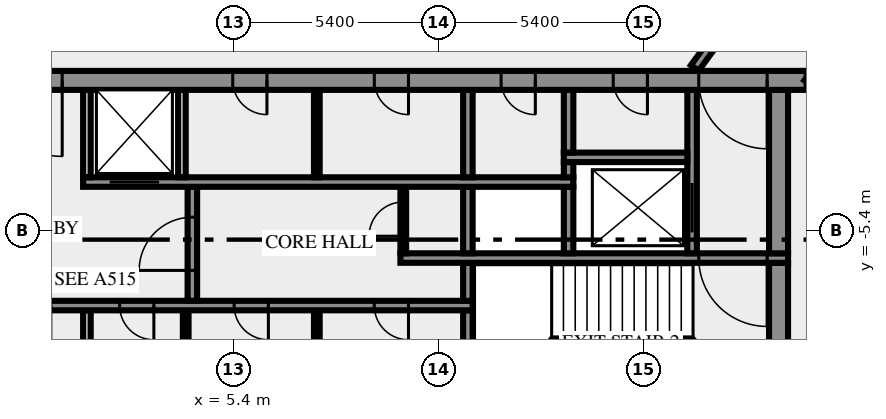
"""IFC4 building model, lengths in metres.
Left out: names, types, materials, properties, quantities, classifications, styles, units other than length and angle.
Written with IfcOpenShell. Run it as: python <this file> out.ifc"""

import sys

from ifc_helpers import new_model, si_unit, direction, frame, frame_2d, origin, place, context, subcontext, project, spatial, rectangle, extrude, element, fill, save


model = new_model("IFC4")
c1 = context("Model", 3, precision=1e-05, world=origin(), true_north=direction((0.0, 1.0)))
c2 = subcontext(c1, "Body", "Model", "MODEL_VIEW")
j1 = project(units=[si_unit("LENGTHUNIT", "METRE"), si_unit("PLANEANGLEUNIT", "RADIAN")], contexts=[c1])
p1 = place(None, origin())
s1 = spatial("IfcSite", under=j1, at=p1, CompositionType="ELEMENT")
p2 = place(p1, origin())
s2 = spatial("IfcBuilding", under=s1, at=p2, CompositionType="ELEMENT")
p3 = place(p2, frame((0.0, 0.0, 297.0)))
s3 = spatial("IfcBuildingStorey", under=s2, at=p3, CompositionType="ELEMENT", Elevation=297.0)
p4 = place(p3, frame((1.55, -10.5, 0.0), z_axis=(0.0, 0.0, 1.0), x_axis=(0.0, 1.0, 0.0)))
e1 = element("IfcWall", 1, at=p4, inside=s3, PredefinedType="SOLIDWALL", context=c2, shape_type="SweptSolid", body=[
    extrude(rectangle(XDim=3.0, YDim=0.2, at=frame_2d((1.5, 0.0))), origin(), (0.0, 0.0, 1.0), 3.4),
])
for number, where, z_axis, x_axis in (
    (2, (4.15, -10.5, 0.0), (0.0, 0.0, 1.0), (0.0, 1.0, 0.0)),
    (3, (7.6, -10.5, 0.0), (0.0, 0.0, 1.0), (0.0, 1.0, 0.0)),
):
    element("IfcWall", number, at=place(p3, frame(where, z_axis=z_axis, x_axis=x_axis)), inside=s3, PredefinedType="PARTITIONING", context=c2, shape_type="SweptSolid", body=[
        extrude(rectangle(XDim=3.0, YDim=0.15, at=frame_2d((1.5, 0.0))), origin(), (0.0, 0.0, 1.0), 3.4),
    ])
p5 = place(p3, frame((11.575, -10.5, 0.0), z_axis=(0.0, 0.0, 1.0), x_axis=(0.0, 1.0, 0.0)))
e4 = element("IfcWall", 4, at=p5, inside=s3, PredefinedType="SHEAR", context=c2, shape_type="SweptSolid", body=[
    extrude(rectangle(XDim=3.0, YDim=0.25, at=frame_2d((1.5, 0.0))), origin(), (0.0, 0.0, 1.0), 3.4),
])
p6 = place(p3, frame((19.75, -10.5, 0.0), z_axis=(0.0, 0.0, 1.0), x_axis=(0.0, 1.0, 0.0)))
e5 = element("IfcWall", 5, at=p6, inside=s3, PredefinedType="SHEAR", context=c2, shape_type="SweptSolid", body=[
    extrude(rectangle(XDim=4.25, YDim=0.5, at=frame_2d((2.125, 0.0))), origin(), (0.0, 0.0, 1.0), 3.4),
])
p7 = place(p3, frame((11.7, -7.375, 0.0), z_axis=(0.0, 0.0, 1.0), x_axis=(-1.0, 0.0, 0.0)))
e6 = element("IfcWall", 6, at=p7, inside=s3, PredefinedType="SHEAR", context=c2, shape_type="SweptSolid", body=[
    extrude(rectangle(XDim=23.4, YDim=0.25, at=frame_2d((11.7, 0.0))), origin(), (0.0, 0.0, 1.0), 3.4),
])
p8 = place(p7, frame((22.225, 0.0, 0.0)))
e7 = element("IfcOpeningElement", 7, at=p8, cuts=e6, PredefinedType="OPENING", context=c2, shape_type="SweptSolid", body=[
    extrude(rectangle(XDim=0.8, YDim=2.1, at=frame_2d((0.4, 1.05))), frame((0.0, 0.135, 0.0), z_axis=(0.0, -1.0, 0.0), x_axis=(1.0, 0.0, 0.0)), (0.0, 0.0, 1.0), 0.27),
])
p9 = place(p7, frame((20.2, 0.0, 0.0)))
e8 = element("IfcOpeningElement", 8, at=p9, cuts=e6, PredefinedType="OPENING", context=c2, shape_type="SweptSolid", body=[
    extrude(rectangle(XDim=1.1, YDim=2.1, at=frame_2d((0.55, 1.05))), frame((0.0, 0.135, 0.0), z_axis=(0.0, -1.0, 0.0), x_axis=(1.0, 0.0, 0.0)), (0.0, 0.0, 1.0), 0.27),
])
p10 = place(p7, frame((17.7, 0.0, 0.0)))
e9 = element("IfcOpeningElement", 9, at=p10, cuts=e6, PredefinedType="OPENING", context=c2, shape_type="SweptSolid", body=[
    extrude(rectangle(XDim=1.1, YDim=2.1, at=frame_2d((0.55, 1.05))), frame((0.0, 0.135, 0.0), z_axis=(0.0, -1.0, 0.0), x_axis=(1.0, 0.0, 0.0)), (0.0, 0.0, 1.0), 0.27),
])
p11 = place(p7, frame((15.975, 0.0, 0.0)))
e10 = element("IfcOpeningElement", 10, at=p11, cuts=e6, PredefinedType="OPENING", context=c2, shape_type="SweptSolid", body=[
    extrude(rectangle(XDim=0.8, YDim=2.1, at=frame_2d((0.4, 1.05))), frame((0.0, 0.135, 0.0), z_axis=(0.0, -1.0, 0.0), x_axis=(1.0, 0.0, 0.0)), (0.0, 0.0, 1.0), 0.27),
])
p12 = place(p7, frame((13.875, 0.0, 0.0)))
e11 = element("IfcOpeningElement", 11, at=p12, cuts=e6, PredefinedType="OPENING", context=c2, shape_type="SweptSolid", body=[
    extrude(rectangle(XDim=0.9, YDim=2.1, at=frame_2d((0.45, 1.05))), frame((0.0, 0.135, 0.0), z_axis=(0.0, -1.0, 0.0), x_axis=(1.0, 0.0, 0.0)), (0.0, 0.0, 1.0), 0.27),
])
p13 = place(p7, frame((11.1, 0.0, 0.0)))
e12 = element("IfcOpeningElement", 12, at=p13, cuts=e6, PredefinedType="OPENING", context=c2, shape_type="SweptSolid", body=[
    extrude(rectangle(XDim=0.9, YDim=2.1, at=frame_2d((0.45, 1.05))), frame((0.0, 0.135, 0.0), z_axis=(0.0, -1.0, 0.0), x_axis=(1.0, 0.0, 0.0)), (0.0, 0.0, 1.0), 0.27),
])
p14 = place(p7, frame((8.388, 0.0, 0.0)))
e13 = element("IfcOpeningElement", 13, at=p14, cuts=e6, PredefinedType="OPENING", context=c2, shape_type="SweptSolid", body=[
    extrude(rectangle(XDim=0.9, YDim=2.1, at=frame_2d((0.45, 1.05))), frame((0.0, 0.135, 0.0), z_axis=(0.0, -1.0, 0.0), x_axis=(1.0, 0.0, 0.0)), (0.0, 0.0, 1.0), 0.27),
])
p15 = place(p7, frame((5.375, 0.0, 0.0)))
e14 = element("IfcOpeningElement", 14, at=p15, cuts=e6, PredefinedType="OPENING", context=c2, shape_type="SweptSolid", body=[
    extrude(rectangle(XDim=0.9, YDim=2.1, at=frame_2d((0.45, 1.05))), frame((0.0, 0.135, 0.0), z_axis=(0.0, -1.0, 0.0), x_axis=(1.0, 0.0, 0.0)), (0.0, 0.0, 1.0), 0.27),
])
p16 = place(p7, frame((1.688, 0.0, 0.0)))
e15 = element("IfcOpeningElement", 15, at=p16, cuts=e6, PredefinedType="OPENING", context=c2, shape_type="SweptSolid", body=[
    extrude(rectangle(XDim=0.9, YDim=2.1, at=frame_2d((0.45, 1.05))), frame((0.0, 0.135, 0.0), z_axis=(0.0, -1.0, 0.0), x_axis=(1.0, 0.0, 0.0)), (0.0, 0.0, 1.0), 0.27),
])
p17 = place(p3, frame((4.325, -7.25, 0.0), z_axis=(0.0, 0.0, 1.0), x_axis=(0.0, 1.0, 0.0)))
e16 = element("IfcWall", 16, at=p17, inside=s3, PredefinedType="SHEAR", context=c2, shape_type="SweptSolid", body=[
    extrude(rectangle(XDim=3.0, YDim=0.25, at=frame_2d((1.5, 0.0))), origin(), (0.0, 0.0, 1.0), 3.4),
])
p18 = place(p17, frame((0.8, 0.0, 0.0)))
e17 = element("IfcOpeningElement", 17, at=p18, cuts=e16, PredefinedType="OPENING", context=c2, shape_type="SweptSolid", body=[
    extrude(rectangle(XDim=1.4, YDim=2.1, at=frame_2d((0.7, 1.05))), frame((0.0, 0.135, 0.0), z_axis=(0.0, -1.0, 0.0), x_axis=(1.0, 0.0, 0.0)), (0.0, 0.0, 1.0), 0.27),
])
p19 = place(p3, frame((11.575, -7.25, 0.0), z_axis=(0.0, 0.0, 1.0), x_axis=(0.0, 1.0, 0.0)))
e18 = element("IfcWall", 18, at=p19, inside=s3, PredefinedType="SHEAR", context=c2, shape_type="SweptSolid", body=[
    extrude(rectangle(XDim=1.0, YDim=0.25, at=frame_2d((0.5, 0.0))), origin(), (0.0, 0.0, 1.0), 3.4),
])
p20 = place(p3, frame((20.0, -6.125, 0.0), z_axis=(0.0, 0.0, 1.0), x_axis=(-1.0, 0.0, 0.0)))
e19 = element("IfcWall", 19, at=p20, inside=s3, PredefinedType="SHEAR", context=c2, shape_type="SweptSolid", body=[
    extrude(rectangle(XDim=10.2, YDim=0.25, at=frame_2d((5.1, 0.0))), origin(), (0.0, 0.0, 1.0), 3.4),
])
p21 = place(p20, frame((0.55, 0.0, 0.0)))
e20 = element("IfcOpeningElement", 20, at=p21, cuts=e19, PredefinedType="OPENING", context=c2, shape_type="SweptSolid", body=[
    extrude(rectangle(XDim=1.8, YDim=2.1, at=frame_2d((0.9, 1.05))), frame((0.0, 0.135, 0.0), z_axis=(0.0, -1.0, 0.0), x_axis=(1.0, 0.0, 0.0)), (0.0, 0.0, 1.0), 0.27),
])
p22 = place(p3, frame((9.875, -6.0, 0.0), z_axis=(0.0, 0.0, 1.0), x_axis=(0.0, 1.0, 0.0)))
e21 = element("IfcWall", 21, at=p22, inside=s3, PredefinedType="PARTITIONING", context=c2, shape_type="SweptSolid", body=[
    extrude(rectangle(XDim=1.75, YDim=0.15, at=frame_2d((0.875, 0.0))), origin(), (0.0, 0.0, 1.0), 3.4),
])
p23 = place(p22, frame((0.45, 0.0, 0.0)))
e22 = element("IfcOpeningElement", 22, at=p23, cuts=e21, PredefinedType="OPENING", context=c2, shape_type="SweptSolid", body=[
    extrude(rectangle(XDim=0.9, YDim=2.1, at=frame_2d((0.45, 1.05))), frame((0.0, 0.085, 0.0), z_axis=(0.0, -1.0, 0.0), x_axis=(1.0, 0.0, 0.0)), (0.0, 0.0, 1.0), 0.17),
])
for number, where, z_axis, x_axis in (
    (23, (11.575, -6.0, 0.0), (0.0, 0.0, 1.0), (0.0, 1.0, 0.0)),
    (24, (14.225, -6.0, 0.0), (0.0, 0.0, 1.0), (0.0, 1.0, 0.0)),
):
    element("IfcWall", number, at=place(p3, frame(where, z_axis=z_axis, x_axis=x_axis)), inside=s3, PredefinedType="SHEAR", context=c2, shape_type="SweptSolid", body=[
        extrude(rectangle(XDim=1.75, YDim=0.25, at=frame_2d((0.875, 0.0))), origin(), (0.0, 0.0, 1.0), 3.4),
    ])
p24 = place(p3, frame((17.475, -6.0, 0.0), z_axis=(0.0, 0.0, 1.0), x_axis=(0.0, 1.0, 0.0)))
e25 = element("IfcWall", 25, at=p24, inside=s3, PredefinedType="SHEAR", context=c2, shape_type="SweptSolid", body=[
    extrude(rectangle(XDim=4.3, YDim=0.25, at=frame_2d((2.15, 0.0))), origin(), (0.0, 0.0, 1.0), 3.4),
])
p25 = place(p24, frame((0.55, 0.0, 0.0)))
e26 = element("IfcOpeningElement", 26, at=p25, cuts=e25, PredefinedType="OPENING", context=c2, shape_type="SweptSolid", body=[
    extrude(rectangle(XDim=1.3, YDim=2.1, at=frame_2d((0.65, 1.05))), frame((0.0, 0.135, 0.0), z_axis=(0.0, -1.0, 0.0), x_axis=(1.0, 0.0, 0.0)), (0.0, 0.0, 1.0), 0.27),
])
p26 = place(p3, frame((19.75, -6.0, 0.0), z_axis=(0.0, 0.0, 1.0), x_axis=(0.0, 1.0, 0.0)))
e27 = element("IfcWall", 27, at=p26, inside=s3, PredefinedType="SHEAR", context=c2, shape_type="SweptSolid", body=[
    extrude(rectangle(XDim=4.3, YDim=0.5, at=frame_2d((2.15, 0.0))), origin(), (0.0, 0.0, 1.0), 3.4),
])
p27 = place(p3, frame((1.45, -4.125, 0.0), z_axis=(0.0, 0.0, 1.0), x_axis=(1.0, 0.0, 0.0)))
e28 = element("IfcWall", 28, at=p27, inside=s3, PredefinedType="SHEAR", context=c2, shape_type="SweptSolid", body=[
    extrude(rectangle(XDim=12.9, YDim=0.25, at=frame_2d((6.45, 0.0))), origin(), (0.0, 0.0, 1.0), 3.4),
])
p28 = place(p27, frame((0.7, 0.0, 0.0)))
e29 = element("IfcOpeningElement", 29, at=p28, cuts=e28, PredefinedType="OPENING", context=c2, shape_type="SweptSolid", body=[
    extrude(rectangle(XDim=1.3, YDim=2.1, at=frame_2d((0.65, 1.05))), frame((0.0, 0.135, 0.0), z_axis=(0.0, -1.0, 0.0), x_axis=(1.0, 0.0, 0.0)), (0.0, 0.0, 1.0), 0.27),
])
for number, where, z_axis, x_axis in (
    (30, (1.55, -4.0, 0.0), (0.0, 0.0, 1.0), (0.0, 1.0, 0.0)),
    (31, (4.05, -4.0, 0.0), (0.0, 0.0, 1.0), (0.0, 1.0, 0.0)),
):
    element("IfcWall", number, at=place(p3, frame(where, z_axis=z_axis, x_axis=x_axis)), inside=s3, PredefinedType="SOLIDWALL", context=c2, shape_type="SweptSolid", body=[
        extrude(rectangle(XDim=2.3, YDim=0.2, at=frame_2d((1.15, 0.0))), origin(), (0.0, 0.0, 1.0), 3.4),
    ])
p29 = place(p3, frame((7.6, -4.0, 0.0), z_axis=(0.0, 0.0, 1.0), x_axis=(0.0, 1.0, 0.0)))
e32 = element("IfcWall", 32, at=p29, inside=s3, PredefinedType="PARTITIONING", context=c2, shape_type="SweptSolid", body=[
    extrude(rectangle(XDim=2.3, YDim=0.15, at=frame_2d((1.15, 0.0))), origin(), (0.0, 0.0, 1.0), 3.4),
])
p30 = place(p3, frame((11.575, -4.0, 0.0), z_axis=(0.0, 0.0, 1.0), x_axis=(0.0, 1.0, 0.0)))
e33 = element("IfcWall", 33, at=p30, inside=s3, PredefinedType="SHEAR", context=c2, shape_type="SweptSolid", body=[
    extrude(rectangle(XDim=2.3, YDim=0.25, at=frame_2d((1.15, 0.0))), origin(), (0.0, 0.0, 1.0), 3.4),
])
p31 = place(p3, frame((14.225, -4.0, 0.0), z_axis=(0.0, 0.0, 1.0), x_axis=(0.0, 1.0, 0.0)))
e34 = element("IfcWall", 34, at=p31, inside=s3, PredefinedType="SHEAR", context=c2, shape_type="SweptSolid", body=[
    extrude(rectangle(XDim=0.4, YDim=0.25, at=frame_2d((0.2, 0.0))), origin(), (0.0, 0.0, 1.0), 3.4),
])
p32 = place(p3, frame((14.1, -3.475, 0.0), z_axis=(0.0, 0.0, 1.0), x_axis=(1.0, 0.0, 0.0)))
e35 = element("IfcWall", 35, at=p32, inside=s3, PredefinedType="SHEAR", context=c2, shape_type="SweptSolid", body=[
    extrude(rectangle(XDim=3.25, YDim=0.25, at=frame_2d((1.625, 0.0))), origin(), (0.0, 0.0, 1.0), 3.4),
])
p33 = place(p3, frame((14.225, -3.35, 0.0), z_axis=(0.0, 0.0, 1.0), x_axis=(0.0, 1.0, 0.0)))
e36 = element("IfcWall", 36, at=p33, inside=s3, PredefinedType="SHEAR", context=c2, shape_type="SweptSolid", body=[
    extrude(rectangle(XDim=1.65, YDim=0.25, at=frame_2d((0.825, 0.0))), origin(), (0.0, 0.0, 1.0), 3.4),
])
p34 = place(p3, frame((20.49, -1.45, 0.0), z_axis=(0.0, 0.0, 1.0), x_axis=(-1.0, 0.0, 0.0)))
e37 = element("IfcWall", 37, at=p34, inside=s3, PredefinedType="SHEAR", context=c2, shape_type="SweptSolid", body=[
    extrude(rectangle(XDim=40.98, YDim=0.5, at=frame_2d((20.49, 0.0))), origin(), (0.0, 0.0, 1.0), 3.4),
])
p35 = place(p34, frame((38.14, 0.0, 0.0)))
e38 = element("IfcOpeningElement", 38, at=p35, cuts=e37, PredefinedType="OPENING", context=c2, shape_type="SweptSolid", body=[
    extrude(rectangle(XDim=1.8, YDim=2.1, at=frame_2d((0.9, 1.05))), frame((0.0, 0.26, 0.0), z_axis=(0.0, -1.0, 0.0), x_axis=(1.0, 0.0, 0.0)), (0.0, 0.0, 1.0), 0.52),
])
p36 = place(p34, frame((36.728, 0.0, 0.0)))
e39 = element("IfcOpeningElement", 39, at=p36, cuts=e37, PredefinedType="OPENING", context=c2, shape_type="SweptSolid", body=[
    extrude(rectangle(XDim=0.8, YDim=2.1, at=frame_2d((0.4, 1.05))), frame((0.0, 0.26, 0.0), z_axis=(0.0, -1.0, 0.0), x_axis=(1.0, 0.0, 0.0)), (0.0, 0.0, 1.0), 0.52),
])
p37 = place(p34, frame((35.153, 0.0, 0.0)))
e40 = element("IfcOpeningElement", 40, at=p37, cuts=e37, PredefinedType="OPENING", context=c2, shape_type="SweptSolid", body=[
    extrude(rectangle(XDim=0.8, YDim=2.1, at=frame_2d((0.4, 1.05))), frame((0.0, 0.26, 0.0), z_axis=(0.0, -1.0, 0.0), x_axis=(1.0, 0.0, 0.0)), (0.0, 0.0, 1.0), 0.52),
])
p38 = place(p34, frame((32.94, 0.0, 0.0)))
e41 = element("IfcOpeningElement", 41, at=p38, cuts=e37, PredefinedType="OPENING", context=c2, shape_type="SweptSolid", body=[
    extrude(rectangle(XDim=0.9, YDim=2.1, at=frame_2d((0.45, 1.05))), frame((0.0, 0.26, 0.0), z_axis=(0.0, -1.0, 0.0), x_axis=(1.0, 0.0, 0.0)), (0.0, 0.0, 1.0), 0.52),
])
p39 = place(p34, frame((31.015, 0.0, 0.0)))
e42 = element("IfcOpeningElement", 42, at=p39, cuts=e37, PredefinedType="OPENING", context=c2, shape_type="SweptSolid", body=[
    extrude(rectangle(XDim=0.8, YDim=2.1, at=frame_2d((0.4, 1.05))), frame((0.0, 0.26, 0.0), z_axis=(0.0, -1.0, 0.0), x_axis=(1.0, 0.0, 0.0)), (0.0, 0.0, 1.0), 0.52),
])
p40 = place(p34, frame((24.765, 0.0, 0.0)))
e43 = element("IfcOpeningElement", 43, at=p40, cuts=e37, PredefinedType="OPENING", context=c2, shape_type="SweptSolid", body=[
    extrude(rectangle(XDim=0.8, YDim=2.1, at=frame_2d((0.4, 1.05))), frame((0.0, 0.26, 0.0), z_axis=(0.0, -1.0, 0.0), x_axis=(1.0, 0.0, 0.0)), (0.0, 0.0, 1.0), 0.52),
])
p41 = place(p34, frame((19.59, 0.0, 0.0)))
e44 = element("IfcOpeningElement", 44, at=p41, cuts=e37, PredefinedType="OPENING", context=c2, shape_type="SweptSolid", body=[
    extrude(rectangle(XDim=2.0, YDim=2.1, at=frame_2d((1.0, 1.05))), frame((0.0, 0.26, 0.0), z_axis=(0.0, -1.0, 0.0), x_axis=(1.0, 0.0, 0.0)), (0.0, 0.0, 1.0), 0.52),
])
p42 = place(p34, frame((14.202, 0.0, 0.0)))
e45 = element("IfcOpeningElement", 45, at=p42, cuts=e37, PredefinedType="OPENING", context=c2, shape_type="SweptSolid", body=[
    extrude(rectangle(XDim=0.9, YDim=2.1, at=frame_2d((0.45, 1.05))), frame((0.0, 0.26, 0.0), z_axis=(0.0, -1.0, 0.0), x_axis=(1.0, 0.0, 0.0)), (0.0, 0.0, 1.0), 0.52),
])
p43 = place(p34, frame((10.478, 0.0, 0.0)))
e46 = element("IfcOpeningElement", 46, at=p43, cuts=e37, PredefinedType="OPENING", context=c2, shape_type="SweptSolid", body=[
    extrude(rectangle(XDim=0.9, YDim=2.1, at=frame_2d((0.45, 1.05))), frame((0.0, 0.26, 0.0), z_axis=(0.0, -1.0, 0.0), x_axis=(1.0, 0.0, 0.0)), (0.0, 0.0, 1.0), 0.52),
])
p44 = place(p34, frame((7.14, 0.0, 0.0)))
e47 = element("IfcOpeningElement", 47, at=p44, cuts=e37, PredefinedType="OPENING", context=c2, shape_type="SweptSolid", body=[
    extrude(rectangle(XDim=0.9, YDim=2.1, at=frame_2d((0.45, 1.05))), frame((0.0, 0.26, 0.0), z_axis=(0.0, -1.0, 0.0), x_axis=(1.0, 0.0, 0.0)), (0.0, 0.0, 1.0), 0.52),
])
p45 = place(p34, frame((4.19, 0.0, 0.0)))
e48 = element("IfcOpeningElement", 48, at=p45, cuts=e37, PredefinedType="OPENING", context=c2, shape_type="SweptSolid", body=[
    extrude(rectangle(XDim=0.9, YDim=2.1, at=frame_2d((0.45, 1.05))), frame((0.0, 0.26, 0.0), z_axis=(0.0, -1.0, 0.0), x_axis=(1.0, 0.0, 0.0)), (0.0, 0.0, 1.0), 0.52),
])
p46 = place(p34, frame((1.04, 0.0, 0.0)))
e49 = element("IfcOpeningElement", 49, at=p46, cuts=e37, PredefinedType="OPENING", context=c2, shape_type="SweptSolid", body=[
    extrude(rectangle(XDim=1.8, YDim=2.1, at=frame_2d((0.9, 1.05))), frame((0.0, 0.26, 0.0), z_axis=(0.0, -1.0, 0.0), x_axis=(1.0, 0.0, 0.0)), (0.0, 0.0, 1.0), 0.52),
])
p47 = place(p3, frame((17.545, -1.125, 0.0), z_axis=(0.0, 0.0, 1.0), x_axis=(0.587796810203, 0.809008596935, 0.0)))
e50 = element("IfcWall", 50, at=p47, inside=s3, PredefinedType="SOLIDWALL", context=c2, shape_type="SweptSolid", body=[
    extrude(rectangle(XDim=12.703, YDim=0.25, at=frame_2d((6.352, 0.0))), origin(), (0.0, 0.0, 1.0), 3.4),
])
p48 = place(p47, frame((11.329, 0.0, 0.0)))
e51 = element("IfcOpeningElement", 51, at=p48, cuts=e50, PredefinedType="OPENING", context=c2, shape_type="SweptSolid", body=[
    extrude(rectangle(XDim=0.9, YDim=2.1, at=frame_2d((0.45, 1.05))), frame((0.0, 0.135, 0.0), z_axis=(0.0, -1.0, 0.0), x_axis=(1.0, 0.0, 0.0)), (0.0, 0.0, 1.0), 0.27),
])
p49 = place(p3, frame((27.009, 7.392, 0.0), z_axis=(0.0, 0.0, 1.0), x_axis=(-0.587776457057, -0.809023384414, 0.0)))
e52 = element("IfcWall", 52, at=p49, inside=s3, PredefinedType="SOLIDWALL", context=c2, shape_type="SweptSolid", body=[
    extrude(rectangle(XDim=11.021, YDim=0.25, at=frame_2d((5.51, 0.0))), origin(), (0.0, 0.0, 1.0), 3.4),
])
p50 = place(p49, frame((0.225, 0.0, 0.0)))
e53 = element("IfcOpeningElement", 53, at=p50, cuts=e52, PredefinedType="OPENING", context=c2, shape_type="SweptSolid", body=[
    extrude(rectangle(XDim=0.9, YDim=2.1, at=frame_2d((0.45, 1.05))), frame((0.0, 0.135, 0.0), z_axis=(0.0, -1.0, 0.0), x_axis=(1.0, 0.0, 0.0)), (0.0, 0.0, 1.0), 0.27),
])
p51 = place(p14, origin())
e54 = element("IfcDoor", 54, at=p51, inside=s3, OperationType="SINGLE_SWING_LEFT", PredefinedType="DOOR", context=c2, shape_type="SweptSolid", body=[
    extrude(rectangle(XDim=0.9, YDim=2.1, at=frame_2d((0.45, 1.05))), frame((0.0, 0.025, 0.0), z_axis=(0.0, -1.0, 0.0), x_axis=(1.0, 0.0, 0.0)), (0.0, 0.0, 1.0), 0.05),
])
fill(e13, e54)
p52 = place(p15, origin())
e55 = element("IfcDoor", 55, at=p52, inside=s3, OperationType="SINGLE_SWING_LEFT", PredefinedType="DOOR", context=c2, shape_type="SweptSolid", body=[
    extrude(rectangle(XDim=0.9, YDim=2.1, at=frame_2d((0.45, 1.05))), frame((0.0, 0.025, 0.0), z_axis=(0.0, -1.0, 0.0), x_axis=(1.0, 0.0, 0.0)), (0.0, 0.0, 1.0), 0.05),
])
fill(e14, e55)
p53 = place(p16, origin())
e56 = element("IfcDoor", 56, at=p53, inside=s3, OperationType="SINGLE_SWING_LEFT", PredefinedType="DOOR", context=c2, shape_type="SweptSolid", body=[
    extrude(rectangle(XDim=0.9, YDim=2.1, at=frame_2d((0.45, 1.05))), frame((0.0, 0.025, 0.0), z_axis=(0.0, -1.0, 0.0), x_axis=(1.0, 0.0, 0.0)), (0.0, 0.0, 1.0), 0.05),
])
fill(e15, e56)
p54 = place(p18, origin())
e57 = element("IfcDoor", 57, at=p54, inside=s3, OperationType="DOUBLE_DOOR_SINGLE_SWING", PredefinedType="DOOR", context=c2, shape_type="SweptSolid", body=[
    extrude(rectangle(XDim=1.4, YDim=2.1, at=frame_2d((0.7, 1.05))), frame((0.0, 0.025, 0.0), z_axis=(0.0, -1.0, 0.0), x_axis=(1.0, 0.0, 0.0)), (0.0, 0.0, 1.0), 0.05),
])
fill(e17, e57)
p55 = place(p21, origin())
e58 = element("IfcDoor", 58, at=p55, inside=s3, OperationType="DOUBLE_DOOR_SINGLE_SWING", PredefinedType="DOOR", context=c2, shape_type="SweptSolid", body=[
    extrude(rectangle(XDim=1.8, YDim=2.1, at=frame_2d((0.9, 1.05))), frame((0.0, 0.025, 0.0), z_axis=(0.0, -1.0, 0.0), x_axis=(1.0, 0.0, 0.0)), (0.0, 0.0, 1.0), 0.05),
])
fill(e20, e58)
p56 = place(p23, origin())
e59 = element("IfcDoor", 59, at=p56, inside=s3, OperationType="SINGLE_SWING_RIGHT", PredefinedType="DOOR", context=c2, shape_type="SweptSolid", body=[
    extrude(rectangle(XDim=0.9, YDim=2.1, at=frame_2d((0.45, 1.05))), frame((0.0, 0.025, 0.0), z_axis=(0.0, -1.0, 0.0), x_axis=(1.0, 0.0, 0.0)), (0.0, 0.0, 1.0), 0.05),
])
fill(e22, e59)
p57 = place(p25, origin())
e60 = element("IfcDoor", 60, at=p57, inside=s3, OperationType="DOUBLE_DOOR_SLIDING", PredefinedType="DOOR", context=c2, shape_type="SweptSolid", body=[
    extrude(rectangle(XDim=1.3, YDim=2.1, at=frame_2d((0.65, 1.05))), frame((0.0, 0.025, 0.0), z_axis=(0.0, -1.0, 0.0), x_axis=(1.0, 0.0, 0.0)), (0.0, 0.0, 1.0), 0.05),
])
fill(e26, e60)
p58 = place(p28, origin())
e61 = element("IfcDoor", 61, at=p58, inside=s3, OperationType="DOUBLE_DOOR_SLIDING", PredefinedType="DOOR", context=c2, shape_type="SweptSolid", body=[
    extrude(rectangle(XDim=1.3, YDim=2.1, at=frame_2d((0.65, 1.05))), frame((0.0, 0.025, 0.0), z_axis=(0.0, -1.0, 0.0), x_axis=(1.0, 0.0, 0.0)), (0.0, 0.0, 1.0), 0.05),
])
fill(e29, e61)
p59 = place(p41, origin())
e62 = element("IfcDoor", 62, at=p59, inside=s3, OperationType="DOUBLE_DOOR_SINGLE_SWING", PredefinedType="DOOR", context=c2, shape_type="SweptSolid", body=[
    extrude(rectangle(XDim=2.0, YDim=2.1, at=frame_2d((1.0, 1.05))), frame((0.0, 0.025, 0.0), z_axis=(0.0, -1.0, 0.0), x_axis=(1.0, 0.0, 0.0)), (0.0, 0.0, 1.0), 0.05),
])
fill(e44, e62)
p60 = place(p42, origin())
e63 = element("IfcDoor", 63, at=p60, inside=s3, OperationType="SINGLE_SWING_LEFT", PredefinedType="DOOR", context=c2, shape_type="SweptSolid", body=[
    extrude(rectangle(XDim=0.9, YDim=2.1, at=frame_2d((0.45, 1.05))), frame((0.0, 0.025, 0.0), z_axis=(0.0, -1.0, 0.0), x_axis=(1.0, 0.0, 0.0)), (0.0, 0.0, 1.0), 0.05),
])
fill(e45, e63)
p61 = place(p43, origin())
e64 = element("IfcDoor", 64, at=p61, inside=s3, OperationType="SINGLE_SWING_LEFT", PredefinedType="DOOR", context=c2, shape_type="SweptSolid", body=[
    extrude(rectangle(XDim=0.9, YDim=2.1, at=frame_2d((0.45, 1.05))), frame((0.0, 0.025, 0.0), z_axis=(0.0, -1.0, 0.0), x_axis=(1.0, 0.0, 0.0)), (0.0, 0.0, 1.0), 0.05),
])
fill(e46, e64)
p62 = place(p44, origin())
e65 = element("IfcDoor", 65, at=p62, inside=s3, OperationType="SINGLE_SWING_LEFT", PredefinedType="DOOR", context=c2, shape_type="SweptSolid", body=[
    extrude(rectangle(XDim=0.9, YDim=2.1, at=frame_2d((0.45, 1.05))), frame((0.0, 0.025, 0.0), z_axis=(0.0, -1.0, 0.0), x_axis=(1.0, 0.0, 0.0)), (0.0, 0.0, 1.0), 0.05),
])
fill(e47, e65)
p63 = place(p45, origin())
e66 = element("IfcDoor", 66, at=p63, inside=s3, OperationType="SINGLE_SWING_LEFT", PredefinedType="DOOR", context=c2, shape_type="SweptSolid", body=[
    extrude(rectangle(XDim=0.9, YDim=2.1, at=frame_2d((0.45, 1.05))), frame((0.0, 0.025, 0.0), z_axis=(0.0, -1.0, 0.0), x_axis=(1.0, 0.0, 0.0)), (0.0, 0.0, 1.0), 0.05),
])
fill(e48, e66)
p64 = place(p46, origin())
e67 = element("IfcDoor", 67, at=p64, inside=s3, OperationType="DOUBLE_DOOR_SINGLE_SWING", PredefinedType="DOOR", context=c2, shape_type="SweptSolid", body=[
    extrude(rectangle(XDim=1.8, YDim=2.1, at=frame_2d((0.9, 1.05))), frame((0.0, 0.025, 0.0), z_axis=(0.0, -1.0, 0.0), x_axis=(1.0, 0.0, 0.0)), (0.0, 0.0, 1.0), 0.05),
])
fill(e49, e67)
save(model, sys.argv[1])
